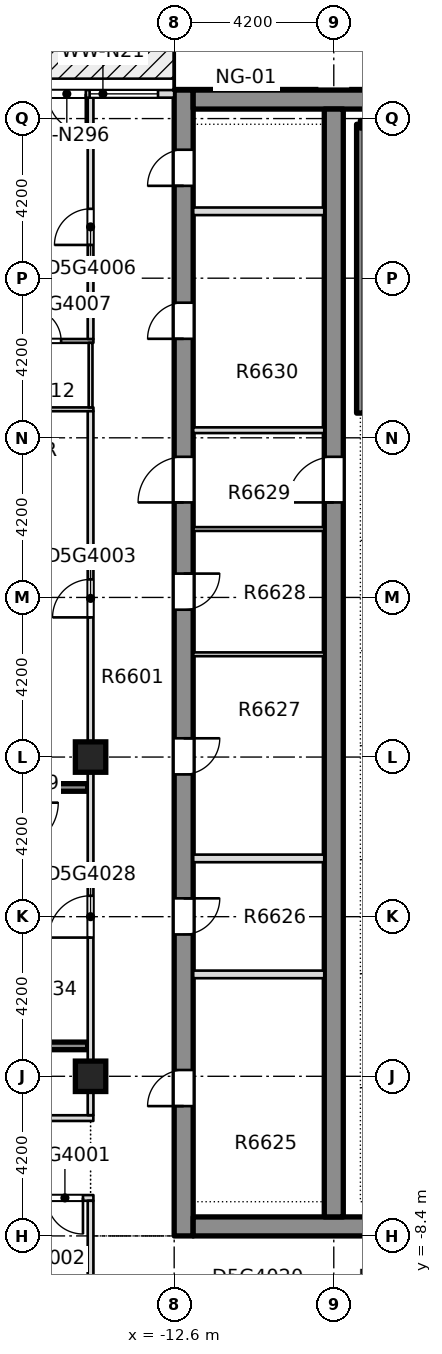
"""IFC4 building model, lengths in metres.
Left out: names, types, materials, properties, quantities, classifications, styles, units other than length and angle.
Written with IfcOpenShell. Run it as: python <this file> out.ifc"""

import sys

from ifc_helpers import new_model, si_unit, direction, frame, frame_2d, origin, origin_2d, place, context, subcontext, project, spatial, rectangle, extrude, element, fill, save


model = new_model("IFC4")
c1 = context("Model", 3, precision=1e-05, world=origin(), true_north=direction((0.0, 1.0)))
c2 = subcontext(c1, "Body", "Model", "MODEL_VIEW")
j1 = project(units=[si_unit("LENGTHUNIT", "METRE"), si_unit("PLANEANGLEUNIT", "RADIAN")], contexts=[c1])
p1 = place(None, origin())
s1 = spatial("IfcSite", under=j1, at=p1, CompositionType="ELEMENT")
p2 = place(p1, origin())
s2 = spatial("IfcBuilding", under=s1, at=p2, CompositionType="ELEMENT")
p3 = place(p2, frame((0.0, 0.0, 251.05)))
s3 = spatial("IfcBuildingStorey", under=s2, at=p3, CompositionType="ELEMENT", Elevation=251.05)
p4 = place(p3, frame((-12.35, -8.4, -0.4), z_axis=(0.0, 0.0, 1.0), x_axis=(0.0, 1.0, 0.0)))
e1 = element("IfcWall", 1, at=p4, inside=s3, PredefinedType="SHEAR", context=c2, shape_type="SweptSolid", body=[
    extrude(rectangle(XDim=30.15, YDim=0.5, at=frame_2d((15.075, 0.0))), origin(), (0.0, 0.0, 1.0), 3.45),
])
p5 = place(p4, frame((3.416, 0.0, 0.4)))
e2 = element("IfcOpeningElement", 2, at=p5, cuts=e1, PredefinedType="OPENING", context=c2, shape_type="SweptSolid", body=[
    extrude(rectangle(XDim=0.95, YDim=2.1, at=frame_2d((0.475, 1.05))), frame((0.0, 0.26, 0.0), z_axis=(0.0, -1.0, 0.0), x_axis=(1.0, 0.0, 0.0)), (0.0, 0.0, 1.0), 0.52),
])
p6 = place(p4, frame((7.932, 0.0, 0.4)))
e3 = element("IfcOpeningElement", 3, at=p6, cuts=e1, PredefinedType="OPENING", context=c2, shape_type="SweptSolid", body=[
    extrude(rectangle(XDim=0.95, YDim=2.1, at=frame_2d((0.475, 1.05))), frame((0.0, 0.26, 0.0), z_axis=(0.0, -1.0, 0.0), x_axis=(1.0, 0.0, 0.0)), (0.0, 0.0, 1.0), 0.52),
])
p7 = place(p4, frame((12.144, 0.0, 0.4)))
e4 = element("IfcOpeningElement", 4, at=p7, cuts=e1, PredefinedType="OPENING", context=c2, shape_type="SweptSolid", body=[
    extrude(rectangle(XDim=0.95, YDim=2.1, at=frame_2d((0.475, 1.05))), frame((0.0, 0.26, 0.0), z_axis=(0.0, -1.0, 0.0), x_axis=(1.0, 0.0, 0.0)), (0.0, 0.0, 1.0), 0.52),
])
p8 = place(p4, frame((16.477, 0.0, 0.4)))
e5 = element("IfcOpeningElement", 5, at=p8, cuts=e1, PredefinedType="OPENING", context=c2, shape_type="SweptSolid", body=[
    extrude(rectangle(XDim=0.95, YDim=2.1, at=frame_2d((0.475, 1.05))), frame((0.0, 0.26, 0.0), z_axis=(0.0, -1.0, 0.0), x_axis=(1.0, 0.0, 0.0)), (0.0, 0.0, 1.0), 0.52),
])
p9 = place(p4, frame((23.605, 0.0, 0.4)))
e6 = element("IfcOpeningElement", 6, at=p9, cuts=e1, PredefinedType="OPENING", context=c2, shape_type="SweptSolid", body=[
    extrude(rectangle(XDim=0.95, YDim=2.1, at=frame_2d((0.475, 1.05))), frame((0.0, 0.26, 0.0), z_axis=(0.0, -1.0, 0.0), x_axis=(1.0, 0.0, 0.0)), (0.0, 0.0, 1.0), 0.52),
])
p10 = place(p4, frame((27.63, 0.0, 0.4)))
e7 = element("IfcOpeningElement", 7, at=p10, cuts=e1, PredefinedType="OPENING", context=c2, shape_type="SweptSolid", body=[
    extrude(rectangle(XDim=0.95, YDim=2.1, at=frame_2d((0.475, 1.05))), frame((0.0, 0.26, 0.0), z_axis=(0.0, -1.0, 0.0), x_axis=(1.0, 0.0, 0.0)), (0.0, 0.0, 1.0), 0.52),
])
p11 = place(p4, frame((19.3, 0.0, 0.4)))
e8 = element("IfcOpeningElement", 8, at=p11, cuts=e1, PredefinedType="OPENING", context=c2, shape_type="SweptSolid", body=[
    extrude(rectangle(XDim=1.2, YDim=2.1, at=frame_2d((0.6, 1.05))), frame((0.0, 0.26, 0.0), z_axis=(0.0, -1.0, 0.0), x_axis=(1.0, 0.0, 0.0)), (0.0, 0.0, 1.0), 0.52),
])
p12 = place(p3, frame((-12.1, -8.15, -0.4), z_axis=(0.0, 0.0, 1.0), x_axis=(1.0, 0.0, 0.0)))
e9 = element("IfcWall", 9, at=p12, inside=s3, PredefinedType="SHEAR", context=c2, shape_type="SweptSolid", body=[
    extrude(rectangle(XDim=24.2, YDim=0.5, at=frame_2d((12.1, 0.0))), origin(), (0.0, 0.0, 1.0), 3.45),
])
p13 = place(p12, frame((7.35, 0.0, 0.4)))
e10 = element("IfcOpeningElement", 10, at=p13, cuts=e9, PredefinedType="OPENING", context=c2, shape_type="SweptSolid", body=[
    extrude(rectangle(XDim=1.8, YDim=2.1, at=frame_2d((0.9, 1.05))), frame((0.0, 0.26, 0.0), z_axis=(0.0, -1.0, 0.0), x_axis=(1.0, 0.0, 0.0)), (0.0, 0.0, 1.0), 0.52),
])
p14 = place(p12, frame((15.05, 0.0, 0.4)))
e11 = element("IfcOpeningElement", 11, at=p14, cuts=e9, PredefinedType="OPENING", context=c2, shape_type="SweptSolid", body=[
    extrude(rectangle(XDim=1.8, YDim=2.1, at=frame_2d((0.9, 1.05))), frame((0.0, 0.26, 0.0), z_axis=(0.0, -1.0, 0.0), x_axis=(1.0, 0.0, 0.0)), (0.0, 0.0, 1.0), 0.52),
])
p15 = place(p3, frame((-12.1, 21.5, -0.4), z_axis=(0.0, 0.0, 1.0), x_axis=(1.0, 0.0, 0.0)))
e12 = element("IfcWall", 12, at=p15, inside=s3, PredefinedType="SHEAR", context=c2, shape_type="SweptSolid", body=[
    extrude(rectangle(XDim=24.2, YDim=0.5, at=frame_2d((12.1, 0.0))), origin(), (0.0, 0.0, 1.0), 3.45),
])
p16 = place(p3, frame((-8.4, -7.9, -0.4), z_axis=(0.0, 0.0, 1.0), x_axis=(0.0, 1.0, 0.0)))
e13 = element("IfcWall", 13, at=p16, inside=s3, PredefinedType="SHEAR", context=c2, shape_type="SweptSolid", body=[
    extrude(rectangle(XDim=29.15, YDim=0.5, at=frame_2d((14.575, 0.0))), origin(), (0.0, 0.0, 1.0), 3.45),
])
p17 = place(p16, frame((18.8, 0.0, 0.4)))
e14 = element("IfcOpeningElement", 14, at=p17, cuts=e13, PredefinedType="OPENING", context=c2, shape_type="SweptSolid", body=[
    extrude(rectangle(XDim=1.2, YDim=2.1, at=frame_2d((0.6, 1.05))), frame((0.0, 0.26, 0.0), z_axis=(0.0, -1.0, 0.0), x_axis=(1.0, 0.0, 0.0)), (0.0, 0.0, 1.0), 0.52),
])
for number, where, z_axis, x_axis in (
    (15, (-14.8, -4.2, -0.4), (0.0, 0.0, 1.0), (1.0, 0.0, 0.0)),
    (16, (-14.8, 4.2, -0.4), (0.0, 0.0, 1.0), (1.0, 0.0, 0.0)),
):
    element("IfcColumn", number, at=place(p3, frame(where, z_axis=z_axis, x_axis=x_axis)), inside=s3, PredefinedType="COLUMN", context=c2, shape_type="SweptSolid", body=[
        extrude(rectangle(XDim=0.8, YDim=0.8, at=origin_2d()), origin(), (0.0, 0.0, 1.0), 3.45),
    ])
p18 = place(p3, frame((-25.75, -7.4, 0.0), z_axis=(0.0, 0.0, 1.0), x_axis=(1.0, 0.0, 0.0)))
e17 = element("IfcWall", 17, at=p18, inside=s3, PredefinedType="PARTITIONING", context=c2, shape_type="SweptSolid", body=[
    extrude(rectangle(XDim=11.025, YDim=0.15, at=frame_2d((5.512, 0.0))), origin(), (0.0, 0.0, 1.0), 3.05),
])
p19 = place(p18, frame((9.8, 0.0, 0.0)))
e18 = element("IfcOpeningElement", 18, at=p19, cuts=e17, PredefinedType="OPENING", context=c2, shape_type="SweptSolid", body=[
    extrude(rectangle(XDim=0.95, YDim=2.1, at=frame_2d((0.475, 1.05))), frame((0.0, 0.085, 0.0), z_axis=(0.0, -1.0, 0.0), x_axis=(1.0, 0.0, 0.0)), (0.0, 0.0, 1.0), 0.17),
])
p20 = place(p3, frame((-25.75, -5.3, 0.0), z_axis=(0.0, 0.0, 1.0), x_axis=(1.0, 0.0, 0.0)))
e19 = element("IfcWall", 19, at=p20, inside=s3, PredefinedType="PARTITIONING", context=c2, shape_type="SweptSolid", body=[
    extrude(rectangle(XDim=11.023, YDim=0.15, at=frame_2d((5.511, 0.0))), origin(), (0.0, 0.0, 1.0), 3.05),
])
p21 = place(p3, frame((-20.4, -3.4, 0.0), z_axis=(0.0, 0.0, 1.0), x_axis=(1.0, 0.0, 0.0)))
e20 = element("IfcWall", 20, at=p21, inside=s3, PredefinedType="SOLIDWALL", context=c2, shape_type="SweptSolid", body=[
    extrude(rectangle(XDim=5.523, YDim=0.2, at=frame_2d((2.761, 0.0))), origin(), (0.0, 0.0, 1.0), 3.05),
])
p22 = place(p3, frame((-20.45, 3.4, 0.0), z_axis=(0.0, 0.0, 1.0), x_axis=(1.0, 0.0, 0.0)))
e21 = element("IfcWall", 21, at=p22, inside=s3, PredefinedType="SOLIDWALL", context=c2, shape_type="SweptSolid", body=[
    extrude(rectangle(XDim=5.575, YDim=0.2, at=frame_2d((2.788, 0.0))), origin(), (0.0, 0.0, 1.0), 3.05),
])
p23 = place(p3, frame((-17.25, 13.35, 0.0), z_axis=(0.0, 0.0, 1.0), x_axis=(1.0, 0.0, 0.0)))
e22 = element("IfcWall", 22, at=p23, inside=s3, PredefinedType="PARTITIONING", context=c2, shape_type="SweptSolid", body=[
    extrude(rectangle(XDim=2.525, YDim=0.1, at=frame_2d((1.262, 0.0))), origin(), (0.0, 0.0, 1.0), 3.05),
])
p24 = place(p3, frame((-17.25, 15.15, 0.0), z_axis=(0.0, 0.0, 1.0), x_axis=(1.0, 0.0, 0.0)))
e23 = element("IfcWall", 23, at=p24, inside=s3, PredefinedType="PARTITIONING", context=c2, shape_type="SweptSolid", body=[
    extrude(rectangle(XDim=2.525, YDim=0.1, at=frame_2d((1.262, 0.0))), origin(), (0.0, 0.0, 1.0), 3.05),
])
p25 = place(p24, frame((0.825, 0.0, 0.0)))
e24 = element("IfcOpeningElement", 24, at=p25, cuts=e23, PredefinedType="OPENING", context=c2, shape_type="SweptSolid", body=[
    extrude(rectangle(XDim=0.85, YDim=2.1, at=frame_2d((0.425, 1.05))), frame((0.0, 0.06, 0.0), z_axis=(0.0, -1.0, 0.0), x_axis=(1.0, 0.0, 0.0)), (0.0, 0.0, 1.0), 0.12),
])
p26 = place(p3, frame((-14.8, -10.06, 0.0), z_axis=(0.0, 0.0, 1.0), x_axis=(0.0, 1.0, 0.0)))
e25 = element("IfcWall", 25, at=p26, inside=s3, PredefinedType="PARTITIONING", context=c2, shape_type="SweptSolid", body=[
    extrude(rectangle(XDim=2.585, YDim=0.15, at=frame_2d((1.292, 0.0))), origin(), (0.0, 0.0, 1.0), 3.05),
])
p27 = place(p3, frame((-14.8, -5.223, 0.0), z_axis=(0.0, 0.0, 1.0), x_axis=(0.0, 1.0, 0.0)))
e26 = element("IfcWall", 26, at=p27, inside=s3, PredefinedType="PARTITIONING", context=c2, shape_type="SweptSolid", body=[
    extrude(rectangle(XDim=18.523, YDim=0.15, at=frame_2d((9.261, 0.0))), origin(), (0.0, 0.0, 1.0), 3.05),
])
p28 = place(p27, frame((13.098, 0.0, 0.0)))
e27 = element("IfcOpeningElement", 27, at=p28, cuts=e26, PredefinedType="OPENING", context=c2, shape_type="SweptSolid", body=[
    extrude(rectangle(XDim=1.0, YDim=2.1, at=frame_2d((0.5, 1.05))), frame((0.0, 0.085, 0.0), z_axis=(0.0, -1.0, 0.0), x_axis=(1.0, 0.0, 0.0)), (0.0, 0.0, 1.0), 0.17),
])
p29 = place(p27, frame((4.673, 0.0, 0.0)))
e28 = element("IfcOpeningElement", 28, at=p29, cuts=e26, PredefinedType="OPENING", context=c2, shape_type="SweptSolid", body=[
    extrude(rectangle(XDim=1.1, YDim=2.1, at=frame_2d((0.55, 1.05))), frame((0.0, 0.085, 0.0), z_axis=(0.0, -1.0, 0.0), x_axis=(1.0, 0.0, 0.0)), (0.0, 0.0, 1.0), 0.17),
])
p30 = place(p3, frame((-14.8, 13.4, 0.0), z_axis=(0.0, 0.0, 1.0), x_axis=(0.0, 1.0, 0.0)))
e29 = element("IfcWall", 29, at=p30, inside=s3, PredefinedType="PARTITIONING", context=c2, shape_type="SweptSolid", body=[
    extrude(rectangle(XDim=1.7, YDim=0.1, at=frame_2d((0.85, 0.0))), origin(), (0.0, 0.0, 1.0), 3.05),
])
p31 = place(p3, frame((-14.8, 15.2, 0.0), z_axis=(0.0, 0.0, 1.0), x_axis=(0.0, 1.0, 0.0)))
e30 = element("IfcWall", 30, at=p31, inside=s3, PredefinedType="PARTITIONING", context=c2, shape_type="SweptSolid", body=[
    extrude(rectangle(XDim=6.35, YDim=0.15, at=frame_2d((3.175, 0.0))), origin(), (0.0, 0.0, 1.0), 3.05),
])
p32 = place(p31, frame((2.475, 0.0, 0.0)))
e31 = element("IfcOpeningElement", 31, at=p32, cuts=e30, PredefinedType="OPENING", context=c2, shape_type="SweptSolid", body=[
    extrude(rectangle(XDim=0.95, YDim=2.1, at=frame_2d((0.475, 1.05))), frame((0.0, 0.085, 0.0), z_axis=(0.0, -1.0, 0.0), x_axis=(1.0, 0.0, 0.0)), (0.0, 0.0, 1.0), 0.17),
])
p33 = place(p3, frame((-12.6, 21.65, 0.0), z_axis=(0.0, 0.0, 1.0), x_axis=(-1.0, 0.0, 0.0)))
e32 = element("IfcWall", 32, at=p33, inside=s3, PredefinedType="STANDARD", context=c2, shape_type="SweptSolid", body=[
    extrude(rectangle(XDim=3.75, YDim=0.2, at=frame_2d((1.875, 0.0))), origin(), (0.0, 0.0, 1.0), 3.05),
])
p34 = place(p33, frame((0.425, 0.0, 0.2)))
e33 = element("IfcOpeningElement", 33, at=p34, cuts=e32, PredefinedType="OPENING", context=c2, shape_type="SweptSolid", body=[
    extrude(rectangle(XDim=1.8, YDim=2.65, at=frame_2d((0.9, 1.325))), frame((0.0, 0.11, 0.0), z_axis=(0.0, -1.0, 0.0), x_axis=(1.0, 0.0, 0.0)), (0.0, 0.0, 1.0), 0.22),
])
p35 = place(p33, frame((2.325, 0.0, 0.0)))
e34 = element("IfcOpeningElement", 34, at=p35, cuts=e32, PredefinedType="OPENING", context=c2, shape_type="SweptSolid", body=[
    extrude(rectangle(XDim=1.0, YDim=2.4, at=frame_2d((0.5, 1.2))), frame((0.0, 0.11, 0.0), z_axis=(0.0, -1.0, 0.0), x_axis=(1.0, 0.0, 0.0)), (0.0, 0.0, 1.0), 0.22),
])
for number, where, z_axis, x_axis in (
    (35, (-12.099, -1.519, 0.0), (0.0, 0.0, 1.0), (1.0, 0.0, 0.0)),
    (36, (-12.099, 1.533, 0.0), (0.0, 0.0, 1.0), (1.0, 0.0, 0.0)),
):
    element("IfcWall", number, at=place(p3, frame(where, z_axis=z_axis, x_axis=x_axis)), inside=s3, PredefinedType="PARTITIONING", context=c2, shape_type="SweptSolid", body=[
        extrude(rectangle(XDim=3.448, YDim=0.2, at=frame_2d((1.724, 0.0))), origin(), (0.0, 0.0, 1.0), 3.05),
    ])
for number, where, z_axis, x_axis in (
    (37, (-12.099, 6.904, 0.0), (0.0, 0.0, 1.0), (1.0, 0.0, 0.0)),
    (38, (-12.099, 10.2, 0.0), (0.0, 0.0, 1.0), (1.0, 0.0, 0.0)),
):
    element("IfcWall", number, at=place(p3, frame(where, z_axis=z_axis, x_axis=x_axis)), inside=s3, PredefinedType="PARTITIONING", context=c2, shape_type="SweptSolid", body=[
        extrude(rectangle(XDim=3.448, YDim=0.1, at=frame_2d((1.724, 0.0))), origin(), (0.0, 0.0, 1.0), 3.05),
    ])
p36 = place(p3, frame((-12.099, 12.8, 0.0), z_axis=(0.0, 0.0, 1.0), x_axis=(1.0, 0.0, 0.0)))
e39 = element("IfcWall", 39, at=p36, inside=s3, PredefinedType="PARTITIONING", context=c2, shape_type="SweptSolid", body=[
    extrude(rectangle(XDim=3.448, YDim=0.15, at=frame_2d((1.724, 0.0))), origin(), (0.0, 0.0, 1.0), 3.05),
])
p37 = place(p3, frame((-12.099, 18.56, 0.0), z_axis=(0.0, 0.0, 1.0), x_axis=(1.0, 0.0, 0.0)))
e40 = element("IfcWall", 40, at=p37, inside=s3, PredefinedType="PARTITIONING", context=c2, shape_type="SweptSolid", body=[
    extrude(rectangle(XDim=3.448, YDim=0.2, at=frame_2d((1.724, 0.0))), origin(), (0.0, 0.0, 1.0), 3.05),
])
p38 = place(p3, frame((-7.7, 13.25, 0.0), z_axis=(0.0, 0.0, 1.0), x_axis=(0.0, 1.0, 0.0)))
e41 = element("IfcWall", 41, at=p38, inside=s3, PredefinedType="SOLIDWALL", context=c2, shape_type="SweptSolid", body=[
    extrude(rectangle(XDim=7.6, YDim=0.2, at=frame_2d((3.8, 0.0))), origin(), (0.0, 0.0, 1.0), 3.05),
])
p39 = place(p3, frame((-7.7, 20.85, 0.0), z_axis=(0.0, 0.0, 1.0), x_axis=(1.0, 0.0, 0.0)))
e42 = element("IfcWall", 42, at=p39, inside=s3, PredefinedType="SOLIDWALL", context=c2, shape_type="SweptSolid", body=[
    extrude(rectangle(XDim=3.55, YDim=0.2, at=frame_2d((1.775, 0.0))), origin(), (0.0, 0.0, 1.0), 3.05),
])
p40 = place(p19, origin())
e43 = element("IfcDoor", 43, at=p40, inside=s3, OperationType="SINGLE_SWING_RIGHT", PredefinedType="DOOR", context=c2, shape_type="SweptSolid", body=[
    extrude(rectangle(XDim=0.95, YDim=2.1, at=frame_2d((0.475, 1.05))), frame((0.0, 0.025, 0.0), z_axis=(0.0, -1.0, 0.0), x_axis=(1.0, 0.0, 0.0)), (0.0, 0.0, 1.0), 0.05),
])
fill(e18, e43)
p41 = place(p28, origin())
e44 = element("IfcDoor", 44, at=p41, inside=s3, OperationType="SINGLE_SWING_LEFT", PredefinedType="DOOR", context=c2, shape_type="SweptSolid", body=[
    extrude(rectangle(XDim=1.0, YDim=2.1, at=frame_2d((0.5, 1.05))), frame((0.0, 0.025, 0.0), z_axis=(0.0, -1.0, 0.0), x_axis=(1.0, 0.0, 0.0)), (0.0, 0.0, 1.0), 0.05),
])
fill(e27, e44)
p42 = place(p32, origin())
e45 = element("IfcDoor", 45, at=p42, inside=s3, OperationType="SINGLE_SWING_RIGHT", PredefinedType="DOOR", context=c2, shape_type="SweptSolid", body=[
    extrude(rectangle(XDim=0.95, YDim=2.1, at=frame_2d((0.475, 1.05))), frame((0.0, 0.025, 0.0), z_axis=(0.0, -1.0, 0.0), x_axis=(1.0, 0.0, 0.0)), (0.0, 0.0, 1.0), 0.05),
])
fill(e31, e45)
p43 = place(p25, origin())
e46 = element("IfcDoor", 46, at=p43, inside=s3, OperationType="SINGLE_SWING_RIGHT", PredefinedType="DOOR", context=c2, shape_type="SweptSolid", body=[
    extrude(rectangle(XDim=0.85, YDim=2.1, at=frame_2d((0.425, 1.05))), frame((0.0, 0.025, 0.0), z_axis=(0.0, -1.0, 0.0), x_axis=(1.0, 0.0, 0.0)), (0.0, 0.0, 1.0), 0.05),
])
fill(e24, e46)
p44 = place(p29, origin())
e47 = element("IfcDoor", 47, at=p44, inside=s3, OperationType="SINGLE_SWING_LEFT", PredefinedType="DOOR", context=c2, shape_type="SweptSolid", body=[
    extrude(rectangle(XDim=1.1, YDim=2.1, at=frame_2d((0.55, 1.05))), frame((0.0, 0.025, 0.0), z_axis=(0.0, -1.0, 0.0), x_axis=(1.0, 0.0, 0.0)), (0.0, 0.0, 1.0), 0.05),
])
fill(e28, e47)
p45 = place(p34, origin())
e48 = element("IfcWindow", 48, at=p45, inside=s3, PartitioningType="SINGLE_PANEL", PredefinedType="WINDOW", context=c2, shape_type="SweptSolid", body=[
    extrude(rectangle(XDim=1.8, YDim=2.65, at=frame_2d((0.9, 1.325))), frame((0.0, 0.03, 0.0), z_axis=(0.0, -1.0, 0.0), x_axis=(1.0, 0.0, 0.0)), (0.0, 0.0, 1.0), 0.06),
])
fill(e33, e48)
p46 = place(p35, origin())
e49 = element("IfcDoor", 49, at=p46, inside=s3, OperationType="SINGLE_SWING_LEFT", PredefinedType="DOOR", context=c2, shape_type="SweptSolid", body=[
    extrude(rectangle(XDim=1.0, YDim=2.4, at=frame_2d((0.5, 1.2))), frame((0.0, 0.025, 0.0), z_axis=(0.0, -1.0, 0.0), x_axis=(1.0, 0.0, 0.0)), (0.0, 0.0, 1.0), 0.05),
])
fill(e34, e49)
p47 = place(p5, origin())
e50 = element("IfcDoor", 50, at=p47, inside=s3, OperationType="SINGLE_SWING_LEFT", PredefinedType="DOOR", context=c2, shape_type="SweptSolid", body=[
    extrude(rectangle(XDim=0.95, YDim=2.1, at=frame_2d((0.475, 1.05))), frame((0.0, 0.025, 0.0), z_axis=(0.0, -1.0, 0.0), x_axis=(1.0, 0.0, 0.0)), (0.0, 0.0, 1.0), 0.05),
])
fill(e2, e50)
p48 = place(p6, origin())
e51 = element("IfcDoor", 51, at=p48, inside=s3, OperationType="SINGLE_SWING_LEFT", PredefinedType="DOOR", context=c2, shape_type="SweptSolid", body=[
    extrude(rectangle(XDim=0.95, YDim=2.1, at=frame_2d((0.475, 1.05))), frame((0.0, 0.025, 0.0), z_axis=(0.0, -1.0, 0.0), x_axis=(1.0, 0.0, 0.0)), (0.0, 0.0, 1.0), 0.05),
])
fill(e3, e51)
p49 = place(p7, origin())
e52 = element("IfcDoor", 52, at=p49, inside=s3, OperationType="SINGLE_SWING_LEFT", PredefinedType="DOOR", context=c2, shape_type="SweptSolid", body=[
    extrude(rectangle(XDim=0.95, YDim=2.1, at=frame_2d((0.475, 1.05))), frame((0.0, 0.025, 0.0), z_axis=(0.0, -1.0, 0.0), x_axis=(1.0, 0.0, 0.0)), (0.0, 0.0, 1.0), 0.05),
])
fill(e4, e52)
p50 = place(p8, origin())
e53 = element("IfcDoor", 53, at=p50, inside=s3, OperationType="SINGLE_SWING_LEFT", PredefinedType="DOOR", context=c2, shape_type="SweptSolid", body=[
    extrude(rectangle(XDim=0.95, YDim=2.1, at=frame_2d((0.475, 1.05))), frame((0.0, 0.025, 0.0), z_axis=(0.0, -1.0, 0.0), x_axis=(1.0, 0.0, 0.0)), (0.0, 0.0, 1.0), 0.05),
])
fill(e5, e53)
p51 = place(p9, origin())
e54 = element("IfcDoor", 54, at=p51, inside=s3, OperationType="SINGLE_SWING_LEFT", PredefinedType="DOOR", context=c2, shape_type="SweptSolid", body=[
    extrude(rectangle(XDim=0.95, YDim=2.1, at=frame_2d((0.475, 1.05))), frame((0.0, 0.025, 0.0), z_axis=(0.0, -1.0, 0.0), x_axis=(1.0, 0.0, 0.0)), (0.0, 0.0, 1.0), 0.05),
])
fill(e6, e54)
p52 = place(p10, origin())
e55 = element("IfcDoor", 55, at=p52, inside=s3, OperationType="SINGLE_SWING_LEFT", PredefinedType="DOOR", context=c2, shape_type="SweptSolid", body=[
    extrude(rectangle(XDim=0.95, YDim=2.1, at=frame_2d((0.475, 1.05))), frame((0.0, 0.025, 0.0), z_axis=(0.0, -1.0, 0.0), x_axis=(1.0, 0.0, 0.0)), (0.0, 0.0, 1.0), 0.05),
])
fill(e7, e55)
p53 = place(p11, origin())
e56 = element("IfcDoor", 56, at=p53, inside=s3, OperationType="SINGLE_SWING_LEFT", PredefinedType="DOOR", context=c2, shape_type="SweptSolid", body=[
    extrude(rectangle(XDim=1.2, YDim=2.1, at=frame_2d((0.6, 1.05))), frame((0.0, 0.025, 0.0), z_axis=(0.0, -1.0, 0.0), x_axis=(1.0, 0.0, 0.0)), (0.0, 0.0, 1.0), 0.05),
])
fill(e8, e56)
p54 = place(p17, origin())
e57 = element("IfcDoor", 57, at=p54, inside=s3, OperationType="SINGLE_SWING_LEFT", PredefinedType="DOOR", context=c2, shape_type="SweptSolid", body=[
    extrude(rectangle(XDim=1.2, YDim=2.1, at=frame_2d((0.6, 1.05))), frame((0.0, 0.025, 0.0), z_axis=(0.0, -1.0, 0.0), x_axis=(1.0, 0.0, 0.0)), (0.0, 0.0, 1.0), 0.05),
])
fill(e14, e57)
save(model, sys.argv[1])
